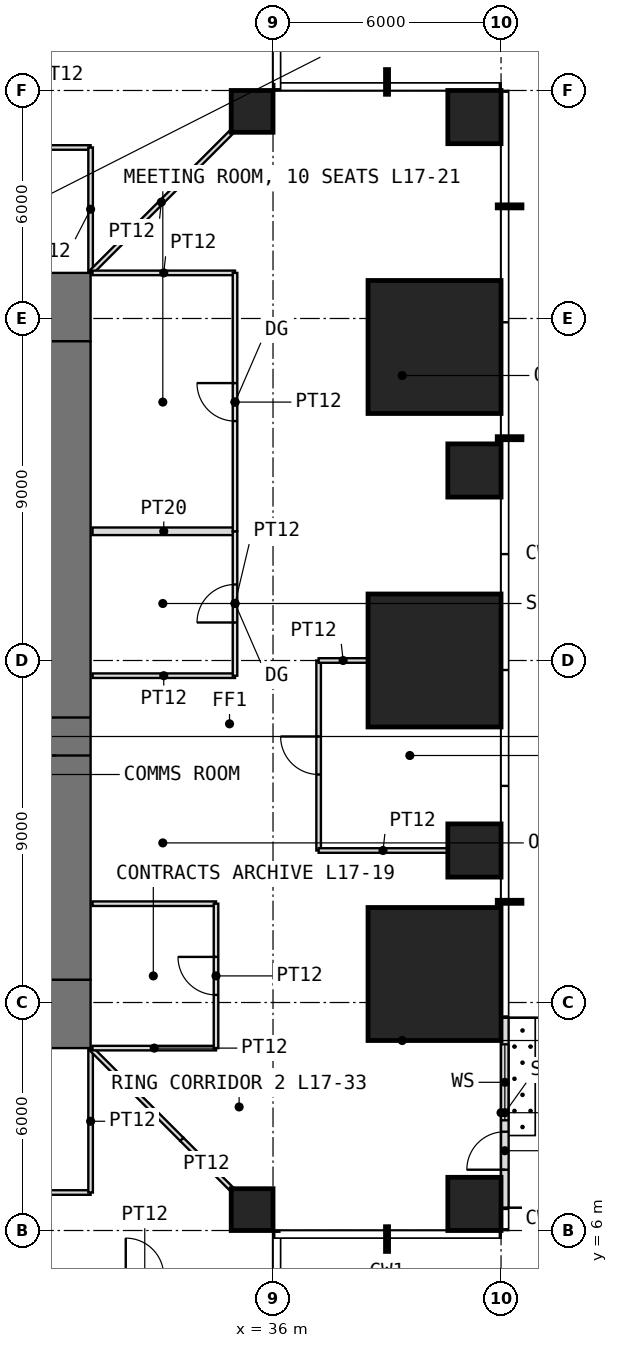
"""IFC4 building model, lengths in metres.
Left out: names, types, materials, properties, quantities, classifications, styles, units other than length and angle.
Written with IfcOpenShell. Run it as: python <this file> out.ifc"""

import sys

from ifc_helpers import new_model, si_unit, direction, frame, frame_2d, origin, origin_2d, place, context, subcontext, project, spatial, rectangle, extrude, element, fill, save


model = new_model("IFC4")
c1 = context("Model", 3, precision=1e-05, world=origin(), true_north=direction((0.0, 1.0)))
c2 = subcontext(c1, "Body", "Model", "MODEL_VIEW")
j1 = project(units=[si_unit("LENGTHUNIT", "METRE"), si_unit("PLANEANGLEUNIT", "RADIAN")], contexts=[c1])
p1 = place(None, origin())
s1 = spatial("IfcSite", under=j1, at=p1, CompositionType="ELEMENT")
p2 = place(p1, origin())
s2 = spatial("IfcBuilding", under=s1, at=p2, CompositionType="ELEMENT")
p3 = place(p2, frame((0.0, 0.0, 74.5)))
s3 = spatial("IfcBuildingStorey", under=s2, at=p3, CompositionType="ELEMENT", Elevation=74.5)
p4 = place(p3, frame((35.45, 6.55, 0.0), z_axis=(0.0, 0.0, 1.0), x_axis=(1.0, 0.0, 0.0)))
e1 = element("IfcColumn", 1, at=p4, inside=s3, PredefinedType="COLUMN", context=c2, shape_type="SweptSolid", body=[
    extrude(rectangle(XDim=1.1, YDim=1.1, at=origin_2d()), origin(), (0.0, 0.0, 1.0), 4.0),
])
p5 = place(p3, frame((41.3, 6.7, 0.0), z_axis=(0.0, 0.0, 1.0), x_axis=(1.0, 0.0, 0.0)))
e2 = element("IfcColumn", 2, at=p5, inside=s3, PredefinedType="COLUMN", context=c2, shape_type="SweptSolid", body=[
    extrude(rectangle(XDim=1.4, YDim=1.4, at=origin_2d()), origin(), (0.0, 0.0, 1.0), 4.0),
])
p6 = place(p3, frame((40.25, 12.75, 0.0), z_axis=(0.0, 0.0, 1.0), x_axis=(1.0, 0.0, 0.0)))
e3 = element("IfcColumn", 3, at=p6, inside=s3, PredefinedType="COLUMN", context=c2, shape_type="SweptSolid", body=[
    extrude(rectangle(XDim=3.5, YDim=3.5, at=origin_2d()), origin(), (0.0, 0.0, 1.0), 4.0),
])
p7 = place(p3, frame((41.3, 16.0, 0.0), z_axis=(0.0, 0.0, 1.0), x_axis=(1.0, 0.0, 0.0)))
e4 = element("IfcColumn", 4, at=p7, inside=s3, PredefinedType="COLUMN", context=c2, shape_type="SweptSolid", body=[
    extrude(rectangle(XDim=1.4, YDim=1.4, at=origin_2d()), origin(), (0.0, 0.0, 1.0), 4.0),
])
p8 = place(p3, frame((40.25, 21.0, 0.0), z_axis=(0.0, 0.0, 1.0), x_axis=(1.0, 0.0, 0.0)))
e5 = element("IfcColumn", 5, at=p8, inside=s3, PredefinedType="COLUMN", context=c2, shape_type="SweptSolid", body=[
    extrude(rectangle(XDim=3.5, YDim=3.5, at=origin_2d()), origin(), (0.0, 0.0, 1.0), 4.0),
])
p9 = place(p3, frame((41.3, 26.0, 0.0), z_axis=(0.0, 0.0, 1.0), x_axis=(1.0, 0.0, 0.0)))
e6 = element("IfcColumn", 6, at=p9, inside=s3, PredefinedType="COLUMN", context=c2, shape_type="SweptSolid", body=[
    extrude(rectangle(XDim=1.4, YDim=1.4, at=origin_2d()), origin(), (0.0, 0.0, 1.0), 4.0),
])
p10 = place(p3, frame((40.25, 29.25, 0.0), z_axis=(0.0, 0.0, 1.0), x_axis=(1.0, 0.0, 0.0)))
e7 = element("IfcColumn", 7, at=p10, inside=s3, PredefinedType="COLUMN", context=c2, shape_type="SweptSolid", body=[
    extrude(rectangle(XDim=3.5, YDim=3.5, at=origin_2d()), origin(), (0.0, 0.0, 1.0), 4.0),
])
p11 = place(p3, frame((35.45, 35.45, 0.0), z_axis=(0.0, 0.0, 1.0), x_axis=(1.0, 0.0, 0.0)))
e8 = element("IfcColumn", 8, at=p11, inside=s3, PredefinedType="COLUMN", context=c2, shape_type="SweptSolid", body=[
    extrude(rectangle(XDim=1.1, YDim=1.1, at=origin_2d()), origin(), (0.0, 0.0, 1.0), 4.0),
])
p12 = place(p3, frame((41.3, 35.3, 0.0), z_axis=(0.0, 0.0, 1.0), x_axis=(1.0, 0.0, 0.0)))
e9 = element("IfcColumn", 9, at=p12, inside=s3, PredefinedType="COLUMN", context=c2, shape_type="SweptSolid", body=[
    extrude(rectangle(XDim=1.4, YDim=1.4, at=origin_2d()), origin(), (0.0, 0.0, 1.0), 4.0),
])
p13 = place(p3, frame((42.1, 6.6, 0.0), z_axis=(0.0, 0.0, 1.0), x_axis=(0.0, 1.0, 0.0)))
e10 = element("IfcWall", 10, at=p13, inside=s3, PredefinedType="USERDEFINED", context=c2, shape_type="SweptSolid", body=[
    extrude(rectangle(XDim=5.0, YDim=0.2, at=frame_2d((2.5, 0.0))), origin(), (0.0, 0.0, 1.0), 3.75),
])
p14 = place(p13, frame((1.0, 0.0, 0.0)))
e11 = element("IfcOpeningElement", 11, at=p14, cuts=e10, PredefinedType="OPENING", context=c2, shape_type="SweptSolid", body=[
    extrude(rectangle(XDim=1.0, YDim=2.4, at=frame_2d((0.5, 1.2))), frame((0.0, 0.11, 0.0), z_axis=(0.0, -1.0, 0.0), x_axis=(1.0, 0.0, 0.0)), (0.0, 0.0, 1.0), 0.22),
])
p15 = place(p13, frame((2.3, 0.0, 0.3)))
e12 = element("IfcOpeningElement", 12, at=p15, cuts=e10, PredefinedType="OPENING", context=c2, shape_type="SweptSolid", body=[
    extrude(rectangle(XDim=2.0, YDim=2.7, at=frame_2d((1.0, 1.35))), frame((0.0, 0.11, 0.0), z_axis=(0.0, -1.0, 0.0), x_axis=(1.0, 0.0, 0.0)), (0.0, 0.0, 1.0), 0.22),
])
p16 = place(p3, frame((10.8, 11.7, -0.05), z_axis=(0.0, 0.0, 1.0), x_axis=(1.0, 0.0, 0.0)))
e13 = element("IfcWall", 13, at=p16, inside=s3, PredefinedType="SHEAR", context=c2, shape_type="SweptSolid", body=[
    extrude(rectangle(XDim=20.4, YDim=1.8, at=frame_2d((10.2, 0.0))), origin(), (0.0, 0.0, 1.0), 4.0),
])
p17 = place(p16, frame((9.2, 0.0, 0.05)))
e14 = element("IfcOpeningElement", 14, at=p17, cuts=e13, PredefinedType="OPENING", context=c2, shape_type="SweptSolid", body=[
    extrude(rectangle(XDim=2.0, YDim=2.2, at=frame_2d((1.0, 1.1))), frame((0.0, 0.91, 0.0), z_axis=(0.0, -1.0, 0.0), x_axis=(1.0, 0.0, 0.0)), (0.0, 0.0, 1.0), 1.82),
])
p18 = place(p3, frame((10.8, 30.3, -0.05), z_axis=(0.0, 0.0, 1.0), x_axis=(1.0, 0.0, 0.0)))
e15 = element("IfcWall", 15, at=p18, inside=s3, PredefinedType="SHEAR", context=c2, shape_type="SweptSolid", body=[
    extrude(rectangle(XDim=20.4, YDim=1.8, at=frame_2d((10.2, 0.0))), origin(), (0.0, 0.0, 1.0), 4.0),
])
p19 = place(p18, frame((9.2, 0.0, 0.05)))
e16 = element("IfcOpeningElement", 16, at=p19, cuts=e15, PredefinedType="OPENING", context=c2, shape_type="SweptSolid", body=[
    extrude(rectangle(XDim=2.0, YDim=2.2, at=frame_2d((1.0, 1.1))), frame((0.0, 0.91, 0.0), z_axis=(0.0, -1.0, 0.0), x_axis=(1.0, 0.0, 0.0)), (0.0, 0.0, 1.0), 1.82),
])
p20 = place(p3, frame((30.3, 12.6, -0.05), z_axis=(0.0, 0.0, 1.0), x_axis=(0.0, 1.0, 0.0)))
e17 = element("IfcWall", 17, at=p20, inside=s3, PredefinedType="SHEAR", context=c2, shape_type="SweptSolid", body=[
    extrude(rectangle(XDim=16.8, YDim=1.8, at=frame_2d((8.4, 0.0))), origin(), (0.0, 0.0, 1.0), 4.0),
])
p21 = place(p20, frame((5.9, 0.0, 0.05)))
e18 = element("IfcOpeningElement", 18, at=p21, cuts=e17, PredefinedType="OPENING", context=c2, shape_type="SweptSolid", body=[
    extrude(rectangle(XDim=1.0, YDim=2.2, at=frame_2d((0.5, 1.1))), frame((0.0, 0.91, 0.0), z_axis=(0.0, -1.0, 0.0), x_axis=(1.0, 0.0, 0.0)), (0.0, 0.0, 1.0), 1.82),
])
p22 = place(p3, frame((23.6, 7.0, 0.0), z_axis=(0.0, 0.0, 1.0), x_axis=(1.0, 0.0, 0.0)))
e19 = element("IfcWall", 19, at=p22, inside=s3, PredefinedType="PARTITIONING", context=c2, shape_type="SweptSolid", body=[
    extrude(rectangle(XDim=7.6, YDim=0.12, at=frame_2d((3.8, 0.0))), origin(), (0.0, 0.0, 1.0), 3.75),
])
p23 = place(p22, frame((3.3, 0.0, 0.0)))
e20 = element("IfcOpeningElement", 20, at=p23, cuts=e19, PredefinedType="OPENING", context=c2, shape_type="SweptSolid", body=[
    extrude(rectangle(XDim=1.0, YDim=2.4, at=frame_2d((0.5, 1.2))), frame((0.0, 0.07, 0.0), z_axis=(0.0, -1.0, 0.0), x_axis=(1.0, 0.0, 0.0)), (0.0, 0.0, 1.0), 0.14),
])
p24 = place(p3, frame((27.4, 34.5, 0.0), z_axis=(0.0, 0.0, 1.0), x_axis=(1.0, 0.0, 0.0)))
e21 = element("IfcWall", 21, at=p24, inside=s3, PredefinedType="PARTITIONING", context=c2, shape_type="SweptSolid", body=[
    extrude(rectangle(XDim=3.8, YDim=0.12, at=frame_2d((1.9, 0.0))), origin(), (0.0, 0.0, 1.0), 3.75),
])
p25 = place(p24, frame((1.4, 0.0, 0.0)))
e22 = element("IfcOpeningElement", 22, at=p25, cuts=e21, PredefinedType="OPENING", context=c2, shape_type="SweptSolid", body=[
    extrude(rectangle(XDim=1.0, YDim=2.2, at=frame_2d((0.5, 1.1))), frame((0.0, 0.07, 0.0), z_axis=(0.0, -1.0, 0.0), x_axis=(1.0, 0.0, 0.0)), (0.0, 0.0, 1.0), 0.14),
])
p26 = place(p3, frame((31.2, 7.0, 0.0), z_axis=(0.0, 0.0, 1.0), x_axis=(0.0, 1.0, 0.0)))
e23 = element("IfcWall", 23, at=p26, inside=s3, PredefinedType="PARTITIONING", context=c2, shape_type="SweptSolid", body=[
    extrude(rectangle(XDim=3.75, YDim=0.12, at=frame_2d((1.875, 0.0))), origin(), (0.0, 0.0, 1.0), 3.75),
])
p27 = place(p3, frame((31.2, 31.25, 0.0), z_axis=(0.0, 0.0, 1.0), x_axis=(0.0, 1.0, 0.0)))
e24 = element("IfcWall", 24, at=p27, inside=s3, PredefinedType="PARTITIONING", context=c2, shape_type="SweptSolid", body=[
    extrude(rectangle(XDim=3.25, YDim=0.12, at=frame_2d((1.625, 0.0))), origin(), (0.0, 0.0, 1.0), 3.75),
])
p28 = place(p3, frame((31.235, 10.765, 0.0), z_axis=(0.0, 0.0, 1.0), x_axis=(0.707106781187, -0.707106781187, 0.0)))
e25 = element("IfcWall", 25, at=p28, inside=s3, PredefinedType="PARTITIONING", context=c2, shape_type="SweptSolid", body=[
    extrude(rectangle(XDim=3.346, YDim=0.12, at=frame_2d((1.673, 0.0))), origin(), (0.0, 0.0, 1.0), 3.75),
])
p29 = place(p3, frame((31.235, 31.235, 0.0), z_axis=(0.0, 0.0, 1.0), x_axis=(0.707106781187, 0.707106781187, 0.0)))
e26 = element("IfcWall", 26, at=p29, inside=s3, PredefinedType="PARTITIONING", context=c2, shape_type="SweptSolid", body=[
    extrude(rectangle(XDim=5.168, YDim=0.12, at=frame_2d((2.584, 0.0))), origin(), (0.0, 0.0, 1.0), 3.75),
])
for number, where, z_axis, x_axis in (
    (27, (31.25, 10.8, 0.0), (0.0, 0.0, 1.0), (1.0, 0.0, 0.0)),
    (28, (31.25, 14.6, 0.0), (0.0, 0.0, 1.0), (1.0, 0.0, 0.0)),
):
    element("IfcWall", number, at=place(p3, frame(where, z_axis=z_axis, x_axis=x_axis)), inside=s3, PredefinedType="PARTITIONING", context=c2, shape_type="SweptSolid", body=[
        extrude(rectangle(XDim=3.25, YDim=0.12, at=frame_2d((1.625, 0.0))), origin(), (0.0, 0.0, 1.0), 3.75),
    ])
p30 = place(p3, frame((31.25, 20.6, 0.0), z_axis=(0.0, 0.0, 1.0), x_axis=(1.0, 0.0, 0.0)))
e29 = element("IfcWall", 29, at=p30, inside=s3, PredefinedType="PARTITIONING", context=c2, shape_type="SweptSolid", body=[
    extrude(rectangle(XDim=3.75, YDim=0.12, at=frame_2d((1.875, 0.0))), origin(), (0.0, 0.0, 1.0), 3.75),
])
p31 = place(p3, frame((31.25, 24.4, 0.0), z_axis=(0.0, 0.0, 1.0), x_axis=(1.0, 0.0, 0.0)))
e30 = element("IfcWall", 30, at=p31, inside=s3, PredefinedType="PARTITIONING", context=c2, shape_type="SweptSolid", body=[
    extrude(rectangle(XDim=3.75, YDim=0.2, at=frame_2d((1.875, 0.0))), origin(), (0.0, 0.0, 1.0), 3.75),
])
p32 = place(p3, frame((31.25, 31.2, 0.0), z_axis=(0.0, 0.0, 1.0), x_axis=(1.0, 0.0, 0.0)))
e31 = element("IfcWall", 31, at=p32, inside=s3, PredefinedType="PARTITIONING", context=c2, shape_type="SweptSolid", body=[
    extrude(rectangle(XDim=3.75, YDim=0.12, at=frame_2d((1.875, 0.0))), origin(), (0.0, 0.0, 1.0), 3.75),
])
p33 = place(p3, frame((33.602, 8.398, 0.0), z_axis=(0.0, 0.0, 1.0), x_axis=(0.707106781187, -0.707106781187, 0.0)))
e32 = element("IfcWall", 32, at=p33, inside=s3, PredefinedType="PARTITIONING", context=c2, shape_type="SweptSolid", body=[
    extrude(rectangle(XDim=1.822, YDim=0.12, at=frame_2d((0.911, 0.0))), origin(), (0.0, 0.0, 1.0), 3.75),
])
p34 = place(p3, frame((34.5, 10.8, 0.0), z_axis=(0.0, 0.0, 1.0), x_axis=(0.0, 1.0, 0.0)))
e33 = element("IfcWall", 33, at=p34, inside=s3, PredefinedType="PARTITIONING", context=c2, shape_type="SweptSolid", body=[
    extrude(rectangle(XDim=3.8, YDim=0.12, at=frame_2d((1.9, 0.0))), origin(), (0.0, 0.0, 1.0), 3.75),
])
p35 = place(p34, frame((1.4, 0.0, 0.0)))
e34 = element("IfcOpeningElement", 34, at=p35, cuts=e33, PredefinedType="OPENING", context=c2, shape_type="SweptSolid", body=[
    extrude(rectangle(XDim=1.0, YDim=2.2, at=frame_2d((0.5, 1.1))), frame((0.0, 0.07, 0.0), z_axis=(0.0, -1.0, 0.0), x_axis=(1.0, 0.0, 0.0)), (0.0, 0.0, 1.0), 0.14),
])
p36 = place(p3, frame((35.0, 20.6, 0.0), z_axis=(0.0, 0.0, 1.0), x_axis=(0.0, 1.0, 0.0)))
e35 = element("IfcWall", 35, at=p36, inside=s3, PredefinedType="PARTITIONING", context=c2, shape_type="SweptSolid", body=[
    extrude(rectangle(XDim=3.8, YDim=0.12, at=frame_2d((1.9, 0.0))), origin(), (0.0, 0.0, 1.0), 3.75),
])
p37 = place(p36, frame((1.4, 0.0, 0.0)))
e36 = element("IfcOpeningElement", 36, at=p37, cuts=e35, PredefinedType="OPENING", context=c2, shape_type="SweptSolid", body=[
    extrude(rectangle(XDim=1.0, YDim=2.4, at=frame_2d((0.5, 1.2))), frame((0.0, 0.07, 0.0), z_axis=(0.0, -1.0, 0.0), x_axis=(1.0, 0.0, 0.0)), (0.0, 0.0, 1.0), 0.14),
])
p38 = place(p3, frame((35.0, 24.4, 0.0), z_axis=(0.0, 0.0, 1.0), x_axis=(0.0, 1.0, 0.0)))
e37 = element("IfcWall", 37, at=p38, inside=s3, PredefinedType="PARTITIONING", context=c2, shape_type="SweptSolid", body=[
    extrude(rectangle(XDim=6.8, YDim=0.12, at=frame_2d((3.4, 0.0))), origin(), (0.0, 0.0, 1.0), 3.75),
])
p39 = place(p38, frame((2.9, 0.0, 0.0)))
e38 = element("IfcOpeningElement", 38, at=p39, cuts=e37, PredefinedType="OPENING", context=c2, shape_type="SweptSolid", body=[
    extrude(rectangle(XDim=1.0, YDim=2.4, at=frame_2d((0.5, 1.2))), frame((0.0, 0.07, 0.0), z_axis=(0.0, -1.0, 0.0), x_axis=(1.0, 0.0, 0.0)), (0.0, 0.0, 1.0), 0.14),
])
p40 = place(p3, frame((37.2, 16.0, 0.0), z_axis=(0.0, 0.0, 1.0), x_axis=(0.0, 1.0, 0.0)))
e39 = element("IfcWall", 39, at=p40, inside=s3, PredefinedType="PARTITIONING", context=c2, shape_type="SweptSolid", body=[
    extrude(rectangle(XDim=5.0, YDim=0.12, at=frame_2d((2.5, 0.0))), origin(), (0.0, 0.0, 1.0), 3.75),
])
p41 = place(p40, frame((2.0, 0.0, 0.0)))
e40 = element("IfcOpeningElement", 40, at=p41, cuts=e39, PredefinedType="OPENING", context=c2, shape_type="SweptSolid", body=[
    extrude(rectangle(XDim=1.0, YDim=2.2, at=frame_2d((0.5, 1.1))), frame((0.0, 0.07, 0.0), z_axis=(0.0, -1.0, 0.0), x_axis=(1.0, 0.0, 0.0)), (0.0, 0.0, 1.0), 0.14),
])
p42 = place(p3, frame((37.2, 16.0, 0.0), z_axis=(0.0, 0.0, 1.0), x_axis=(1.0, 0.0, 0.0)))
e41 = element("IfcWall", 41, at=p42, inside=s3, PredefinedType="PARTITIONING", context=c2, shape_type="SweptSolid", body=[
    extrude(rectangle(XDim=3.39, YDim=0.12, at=frame_2d((1.695, 0.0))), origin(), (0.0, 0.0, 1.0), 3.75),
])
p43 = place(p3, frame((37.2, 21.0, 0.0), z_axis=(0.0, 0.0, 1.0), x_axis=(1.0, 0.0, 0.0)))
e42 = element("IfcWall", 42, at=p43, inside=s3, PredefinedType="PARTITIONING", context=c2, shape_type="SweptSolid", body=[
    extrude(rectangle(XDim=1.29, YDim=0.12, at=frame_2d((0.645, 0.0))), origin(), (0.0, 0.0, 1.0), 3.75),
])
p44 = place(p14, origin())
e43 = element("IfcDoor", 43, at=p44, inside=s3, OperationType="SINGLE_SWING_LEFT", PredefinedType="DOOR", context=c2, shape_type="SweptSolid", body=[
    extrude(rectangle(XDim=1.0, YDim=2.4, at=frame_2d((0.5, 1.2))), frame((0.0, 0.025, 0.0), z_axis=(0.0, -1.0, 0.0), x_axis=(1.0, 0.0, 0.0)), (0.0, 0.0, 1.0), 0.05),
])
fill(e11, e43)
p45 = place(p15, origin())
e44 = element("IfcWindow", 44, at=p45, inside=s3, PartitioningType="SINGLE_PANEL", PredefinedType="WINDOW", context=c2, shape_type="SweptSolid", body=[
    extrude(rectangle(XDim=2.0, YDim=2.7, at=frame_2d((1.0, 1.35))), frame((0.0, 0.03, 0.0), z_axis=(0.0, -1.0, 0.0), x_axis=(1.0, 0.0, 0.0)), (0.0, 0.0, 1.0), 0.06),
])
fill(e12, e44)
p46 = place(p21, origin())
e45 = element("IfcDoor", 45, at=p46, inside=s3, OperationType="SINGLE_SWING_LEFT", PredefinedType="DOOR", context=c2, shape_type="SweptSolid", body=[
    extrude(rectangle(XDim=1.0, YDim=2.2, at=frame_2d((0.5, 1.1))), frame((0.0, 0.025, 0.0), z_axis=(0.0, -1.0, 0.0), x_axis=(1.0, 0.0, 0.0)), (0.0, 0.0, 1.0), 0.05),
])
fill(e18, e45)
p47 = place(p35, origin())
e46 = element("IfcDoor", 46, at=p47, inside=s3, OperationType="SINGLE_SWING_RIGHT", PredefinedType="DOOR", context=c2, shape_type="SweptSolid", body=[
    extrude(rectangle(XDim=1.0, YDim=2.2, at=frame_2d((0.5, 1.1))), frame((0.0, 0.025, 0.0), z_axis=(0.0, -1.0, 0.0), x_axis=(1.0, 0.0, 0.0)), (0.0, 0.0, 1.0), 0.05),
])
fill(e34, e46)
p48 = place(p37, origin())
e47 = element("IfcDoor", 47, at=p48, inside=s3, OperationType="SINGLE_SWING_LEFT", PredefinedType="DOOR", context=c2, shape_type="SweptSolid", body=[
    extrude(rectangle(XDim=1.0, YDim=2.4, at=frame_2d((0.5, 1.2))), frame((0.0, 0.025, 0.0), z_axis=(0.0, -1.0, 0.0), x_axis=(1.0, 0.0, 0.0)), (0.0, 0.0, 1.0), 0.05),
])
fill(e36, e47)
p49 = place(p39, origin())
e48 = element("IfcDoor", 48, at=p49, inside=s3, OperationType="SINGLE_SWING_RIGHT", PredefinedType="DOOR", context=c2, shape_type="SweptSolid", body=[
    extrude(rectangle(XDim=1.0, YDim=2.4, at=frame_2d((0.5, 1.2))), frame((0.0, 0.025, 0.0), z_axis=(0.0, -1.0, 0.0), x_axis=(1.0, 0.0, 0.0)), (0.0, 0.0, 1.0), 0.05),
])
fill(e38, e48)
p50 = place(p41, origin())
e49 = element("IfcDoor", 49, at=p50, inside=s3, OperationType="SINGLE_SWING_RIGHT", PredefinedType="DOOR", context=c2, shape_type="SweptSolid", body=[
    extrude(rectangle(XDim=1.0, YDim=2.2, at=frame_2d((0.5, 1.1))), frame((0.0, 0.025, 0.0), z_axis=(0.0, -1.0, 0.0), x_axis=(1.0, 0.0, 0.0)), (0.0, 0.0, 1.0), 0.05),
])
fill(e40, e49)
save(model, sys.argv[1])
